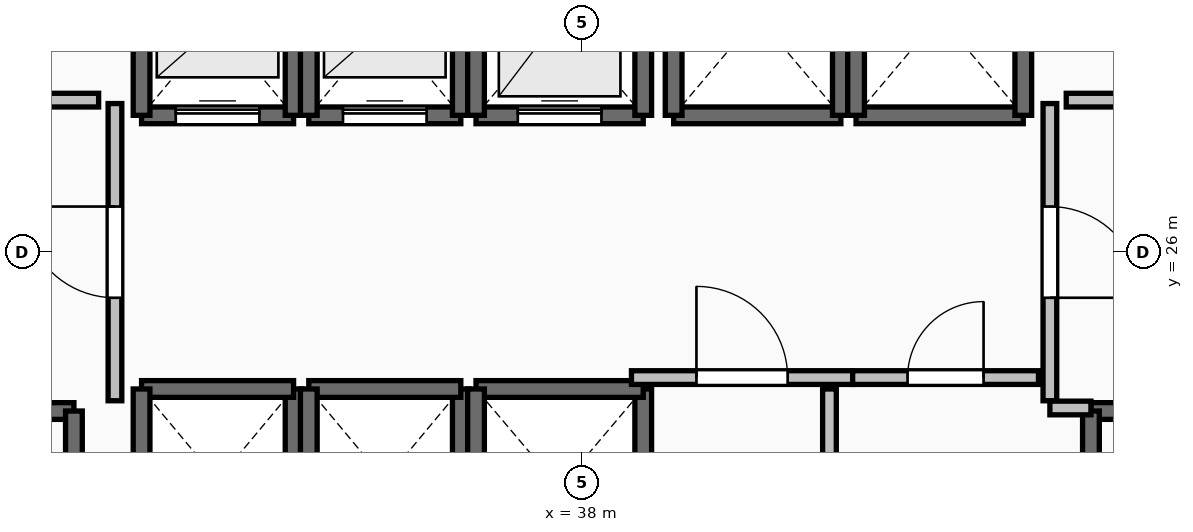
"""IFC4 building model, lengths in metres.
Left out: names, types, materials, properties, quantities, classifications, styles, units other than length and angle.
Written with IfcOpenShell. Run it as: python <this file> out.ifc"""

import sys

from ifc_helpers import new_model, si_unit, direction, frame, frame_2d, origin, place, context, subcontext, project, spatial, rectangle, extrude, element, fill, save


model = new_model("IFC4")
c1 = context("Model", 3, precision=1e-05, world=origin(), true_north=direction((0.0, 1.0)))
c2 = subcontext(c1, "Body", "Model", "MODEL_VIEW")
j1 = project(units=[si_unit("LENGTHUNIT", "METRE"), si_unit("PLANEANGLEUNIT", "RADIAN")], contexts=[c1])
p1 = place(None, origin())
s1 = spatial("IfcSite", under=j1, at=p1, CompositionType="ELEMENT")
p2 = place(p1, origin())
s2 = spatial("IfcBuilding", under=s1, at=p2, CompositionType="ELEMENT")
p3 = place(p2, frame((0.0, 0.0, 41.5)))
s3 = spatial("IfcBuildingStorey", under=s2, at=p3, CompositionType="ELEMENT", Elevation=41.5)
p4 = place(p3, frame((27.94, 23.91, 0.0), z_axis=(0.0, 0.0, 1.0), x_axis=(1.0, 0.0, 0.0)))
e1 = element("IfcWall", 1, at=p4, inside=s3, PredefinedType="SOLIDWALL", context=c2, shape_type="SweptSolid", body=[
    extrude(rectangle(XDim=3.37, YDim=0.22, at=frame_2d((1.685, 0.0))), origin(), (0.0, 0.0, 1.0), 3.24),
])
p5 = place(p4, frame((1.135, 0.0, 0.0)))
e2 = element("IfcOpeningElement", 2, at=p5, cuts=e1, PredefinedType="OPENING", context=c2, shape_type="SweptSolid", body=[
    extrude(rectangle(XDim=1.1, YDim=2.15, at=frame_2d((0.55, 1.075))), frame((0.0, 0.125, 0.0), z_axis=(0.0, -1.0, 0.0), x_axis=(1.0, 0.0, 0.0)), (0.0, 0.0, 1.0), 0.25),
])
p6 = place(p3, frame((31.31, 23.91, 0.0), z_axis=(0.0, 0.0, 1.0), x_axis=(0.0, -1.0, 0.0)))
e3 = element("IfcWall", 3, at=p6, inside=s3, PredefinedType="SOLIDWALL", context=c2, shape_type="SweptSolid", body=[
    extrude(rectangle(XDim=7.42, YDim=0.22, at=frame_2d((3.71, 0.0))), origin(), (0.0, 0.0, 1.0), 3.24),
])
p7 = place(p3, frame((44.69, 23.91, 0.0), z_axis=(0.0, 0.0, 1.0), x_axis=(1.0, 0.0, 0.0)))
e4 = element("IfcWall", 4, at=p7, inside=s3, PredefinedType="SOLIDWALL", context=c2, shape_type="SweptSolid", body=[
    extrude(rectangle(XDim=3.37, YDim=0.22, at=frame_2d((1.685, 0.0))), origin(), (0.0, 0.0, 1.0), 3.24),
])
p8 = place(p7, frame((1.135, 0.0, 0.0)))
e5 = element("IfcOpeningElement", 5, at=p8, cuts=e4, PredefinedType="OPENING", context=c2, shape_type="SweptSolid", body=[
    extrude(rectangle(XDim=1.1, YDim=2.15, at=frame_2d((0.55, 1.075))), frame((0.0, 0.125, 0.0), z_axis=(0.0, -1.0, 0.0), x_axis=(1.0, 0.0, 0.0)), (0.0, 0.0, 1.0), 0.25),
])
p9 = place(p3, frame((44.69, 16.49, 0.0), z_axis=(0.0, 0.0, 1.0), x_axis=(0.0, 1.0, 0.0)))
e6 = element("IfcWall", 6, at=p9, inside=s3, PredefinedType="SOLIDWALL", context=c2, shape_type="SweptSolid", body=[
    extrude(rectangle(XDim=7.42, YDim=0.22, at=frame_2d((3.71, 0.0))), origin(), (0.0, 0.0, 1.0), 3.24),
])
p10 = place(p3, frame((32.2, 27.8, 0.0), z_axis=(0.0, 0.0, 1.0), x_axis=(1.0, 0.0, 0.0)))
e7 = element("IfcWall", 7, at=p10, inside=s3, PredefinedType="SOLIDWALL", context=c2, shape_type="SweptSolid", body=[
    extrude(rectangle(XDim=2.0, YDim=0.22, at=frame_2d((1.0, 0.0))), origin(), (0.0, 0.0, 1.0), 3.24),
])
p11 = place(p10, frame((0.45, 0.0, 0.0)))
e8 = element("IfcOpeningElement", 8, at=p11, cuts=e7, PredefinedType="OPENING", context=c2, shape_type="SweptSolid", body=[
    extrude(rectangle(XDim=1.1, YDim=2.2, at=frame_2d((0.55, 1.1))), frame((0.0, 0.125, 0.0), z_axis=(0.0, -1.0, 0.0), x_axis=(1.0, 0.0, 0.0)), (0.0, 0.0, 1.0), 0.25),
])
for number, where, z_axis, x_axis in (
    (9, (34.2, 27.8, 0.0), (0.0, 0.0, 1.0), (0.0, 1.0, 0.0)),
    (10, (32.2, 30.2, 0.0), (0.0, 0.0, 1.0), (0.0, -1.0, 0.0)),
):
    element("IfcWall", number, at=place(p3, frame(where, z_axis=z_axis, x_axis=x_axis)), inside=s3, PredefinedType="SOLIDWALL", context=c2, shape_type="SweptSolid", body=[
        extrude(rectangle(XDim=2.4, YDim=0.22, at=frame_2d((1.2, 0.0))), origin(), (0.0, 0.0, 1.0), 3.24),
    ])
p12 = place(p3, frame((34.4, 27.8, 0.0), z_axis=(0.0, 0.0, 1.0), x_axis=(1.0, 0.0, 0.0)))
e11 = element("IfcWall", 11, at=p12, inside=s3, PredefinedType="SOLIDWALL", context=c2, shape_type="SweptSolid", body=[
    extrude(rectangle(XDim=2.0, YDim=0.22, at=frame_2d((1.0, 0.0))), origin(), (0.0, 0.0, 1.0), 3.24),
])
p13 = place(p12, frame((0.45, 0.0, 0.0)))
e12 = element("IfcOpeningElement", 12, at=p13, cuts=e11, PredefinedType="OPENING", context=c2, shape_type="SweptSolid", body=[
    extrude(rectangle(XDim=1.1, YDim=2.2, at=frame_2d((0.55, 1.1))), frame((0.0, 0.125, 0.0), z_axis=(0.0, -1.0, 0.0), x_axis=(1.0, 0.0, 0.0)), (0.0, 0.0, 1.0), 0.25),
])
for number, where, z_axis, x_axis in (
    (13, (36.4, 27.8, 0.0), (0.0, 0.0, 1.0), (0.0, 1.0, 0.0)),
    (14, (34.4, 30.2, 0.0), (0.0, 0.0, 1.0), (0.0, -1.0, 0.0)),
):
    element("IfcWall", number, at=place(p3, frame(where, z_axis=z_axis, x_axis=x_axis)), inside=s3, PredefinedType="SOLIDWALL", context=c2, shape_type="SweptSolid", body=[
        extrude(rectangle(XDim=2.4, YDim=0.22, at=frame_2d((1.2, 0.0))), origin(), (0.0, 0.0, 1.0), 3.24),
    ])
p14 = place(p3, frame((36.6, 27.8, 0.0), z_axis=(0.0, 0.0, 1.0), x_axis=(1.0, 0.0, 0.0)))
e15 = element("IfcWall", 15, at=p14, inside=s3, PredefinedType="SOLIDWALL", context=c2, shape_type="SweptSolid", body=[
    extrude(rectangle(XDim=2.2, YDim=0.22, at=frame_2d((1.1, 0.0))), origin(), (0.0, 0.0, 1.0), 3.24),
])
p15 = place(p14, frame((0.55, 0.0, 0.0)))
e16 = element("IfcOpeningElement", 16, at=p15, cuts=e15, PredefinedType="OPENING", context=c2, shape_type="SweptSolid", body=[
    extrude(rectangle(XDim=1.1, YDim=2.2, at=frame_2d((0.55, 1.1))), frame((0.0, 0.125, 0.0), z_axis=(0.0, -1.0, 0.0), x_axis=(1.0, 0.0, 0.0)), (0.0, 0.0, 1.0), 0.25),
])
for number, where, z_axis, x_axis in (
    (17, (38.8, 27.8, 0.0), (0.0, 0.0, 1.0), (0.0, 1.0, 0.0)),
    (18, (36.6, 30.4, 0.0), (0.0, 0.0, 1.0), (0.0, -1.0, 0.0)),
):
    element("IfcWall", number, at=place(p3, frame(where, z_axis=z_axis, x_axis=x_axis)), inside=s3, PredefinedType="SOLIDWALL", context=c2, shape_type="SweptSolid", body=[
        extrude(rectangle(XDim=2.6, YDim=0.22, at=frame_2d((1.3, 0.0))), origin(), (0.0, 0.0, 1.0), 3.24),
    ])
p16 = place(p3, frame((34.2, 21.8, 0.0), z_axis=(0.0, 0.0, 1.0), x_axis=(0.0, 1.0, 0.0)))
e19 = element("IfcWall", 19, at=p16, inside=s3, PredefinedType="SOLIDWALL", context=c2, shape_type="SweptSolid", body=[
    extrude(rectangle(XDim=2.4, YDim=0.22, at=frame_2d((1.2, 0.0))), origin(), (0.0, 0.0, 1.0), 3.24),
])
p17 = place(p3, frame((34.2, 24.2, 0.0), z_axis=(0.0, 0.0, 1.0), x_axis=(-1.0, 0.0, 0.0)))
e20 = element("IfcWall", 20, at=p17, inside=s3, PredefinedType="SOLIDWALL", context=c2, shape_type="SweptSolid", body=[
    extrude(rectangle(XDim=2.0, YDim=0.22, at=frame_2d((1.0, 0.0))), origin(), (0.0, 0.0, 1.0), 3.24),
])
for number, where, z_axis, x_axis in (
    (21, (32.2, 24.2, 0.0), (0.0, 0.0, 1.0), (0.0, -1.0, 0.0)),
    (22, (36.4, 21.8, 0.0), (0.0, 0.0, 1.0), (0.0, 1.0, 0.0)),
):
    element("IfcWall", number, at=place(p3, frame(where, z_axis=z_axis, x_axis=x_axis)), inside=s3, PredefinedType="SOLIDWALL", context=c2, shape_type="SweptSolid", body=[
        extrude(rectangle(XDim=2.4, YDim=0.22, at=frame_2d((1.2, 0.0))), origin(), (0.0, 0.0, 1.0), 3.24),
    ])
p18 = place(p3, frame((36.4, 24.2, 0.0), z_axis=(0.0, 0.0, 1.0), x_axis=(-1.0, 0.0, 0.0)))
e23 = element("IfcWall", 23, at=p18, inside=s3, PredefinedType="SOLIDWALL", context=c2, shape_type="SweptSolid", body=[
    extrude(rectangle(XDim=2.0, YDim=0.22, at=frame_2d((1.0, 0.0))), origin(), (0.0, 0.0, 1.0), 3.24),
])
p19 = place(p3, frame((34.4, 24.2, 0.0), z_axis=(0.0, 0.0, 1.0), x_axis=(0.0, -1.0, 0.0)))
e24 = element("IfcWall", 24, at=p19, inside=s3, PredefinedType="SOLIDWALL", context=c2, shape_type="SweptSolid", body=[
    extrude(rectangle(XDim=2.4, YDim=0.22, at=frame_2d((1.2, 0.0))), origin(), (0.0, 0.0, 1.0), 3.24),
])
p20 = place(p3, frame((38.8, 21.6, 0.0), z_axis=(0.0, 0.0, 1.0), x_axis=(0.0, 1.0, 0.0)))
e25 = element("IfcWall", 25, at=p20, inside=s3, PredefinedType="SOLIDWALL", context=c2, shape_type="SweptSolid", body=[
    extrude(rectangle(XDim=2.6, YDim=0.22, at=frame_2d((1.3, 0.0))), origin(), (0.0, 0.0, 1.0), 3.24),
])
p21 = place(p3, frame((38.8, 24.2, 0.0), z_axis=(0.0, 0.0, 1.0), x_axis=(-1.0, 0.0, 0.0)))
e26 = element("IfcWall", 26, at=p21, inside=s3, PredefinedType="SOLIDWALL", context=c2, shape_type="SweptSolid", body=[
    extrude(rectangle(XDim=2.2, YDim=0.22, at=frame_2d((1.1, 0.0))), origin(), (0.0, 0.0, 1.0), 3.24),
])
p22 = place(p3, frame((36.6, 24.2, 0.0), z_axis=(0.0, 0.0, 1.0), x_axis=(0.0, -1.0, 0.0)))
e27 = element("IfcWall", 27, at=p22, inside=s3, PredefinedType="SOLIDWALL", context=c2, shape_type="SweptSolid", body=[
    extrude(rectangle(XDim=2.6, YDim=0.22, at=frame_2d((1.3, 0.0))), origin(), (0.0, 0.0, 1.0), 3.24),
])
p23 = place(p3, frame((39.2, 27.8, 0.0), z_axis=(0.0, 0.0, 1.0), x_axis=(1.0, 0.0, 0.0)))
e28 = element("IfcWall", 28, at=p23, inside=s3, PredefinedType="SOLIDWALL", context=c2, shape_type="SweptSolid", body=[
    extrude(rectangle(XDim=2.2, YDim=0.22, at=frame_2d((1.1, 0.0))), origin(), (0.0, 0.0, 1.0), 3.24),
])
for number, where, z_axis, x_axis in (
    (29, (41.4, 27.8, 0.0), (0.0, 0.0, 1.0), (0.0, 1.0, 0.0)),
    (30, (39.2, 30.4, 0.0), (0.0, 0.0, 1.0), (0.0, -1.0, 0.0)),
):
    element("IfcWall", number, at=place(p3, frame(where, z_axis=z_axis, x_axis=x_axis)), inside=s3, PredefinedType="SOLIDWALL", context=c2, shape_type="SweptSolid", body=[
        extrude(rectangle(XDim=2.6, YDim=0.22, at=frame_2d((1.3, 0.0))), origin(), (0.0, 0.0, 1.0), 3.24),
    ])
p24 = place(p3, frame((41.6, 27.8, 0.0), z_axis=(0.0, 0.0, 1.0), x_axis=(1.0, 0.0, 0.0)))
e31 = element("IfcWall", 31, at=p24, inside=s3, PredefinedType="SOLIDWALL", context=c2, shape_type="SweptSolid", body=[
    extrude(rectangle(XDim=2.2, YDim=0.22, at=frame_2d((1.1, 0.0))), origin(), (0.0, 0.0, 1.0), 3.24),
])
for number, where, z_axis, x_axis in (
    (32, (43.8, 27.8, 0.0), (0.0, 0.0, 1.0), (0.0, 1.0, 0.0)),
    (33, (41.6, 30.4, 0.0), (0.0, 0.0, 1.0), (0.0, -1.0, 0.0)),
):
    element("IfcWall", number, at=place(p3, frame(where, z_axis=z_axis, x_axis=x_axis)), inside=s3, PredefinedType="SOLIDWALL", context=c2, shape_type="SweptSolid", body=[
        extrude(rectangle(XDim=2.6, YDim=0.22, at=frame_2d((1.3, 0.0))), origin(), (0.0, 0.0, 1.0), 3.24),
    ])
p25 = place(p3, frame((31.85, 24.045, 0.0), z_axis=(0.0, 0.0, 1.0), x_axis=(0.0, 1.0, 0.0)))
e34 = element("IfcWall", 34, at=p25, inside=s3, PredefinedType="PARTITIONING", context=c2, shape_type="SweptSolid", body=[
    extrude(rectangle(XDim=3.91, YDim=0.18, at=frame_2d((1.955, 0.0))), origin(), (0.0, 0.0, 1.0), 3.24),
])
p26 = place(p25, frame((1.355, 0.0, 0.0)))
e35 = element("IfcOpeningElement", 35, at=p26, cuts=e34, PredefinedType="OPENING", context=c2, shape_type="SweptSolid", body=[
    extrude(rectangle(XDim=1.2, YDim=2.15, at=frame_2d((0.6, 1.075))), frame((0.0, 0.105, 0.0), z_axis=(0.0, -1.0, 0.0), x_axis=(1.0, 0.0, 0.0)), (0.0, 0.0, 1.0), 0.21),
])
p27 = place(p3, frame((44.15, 27.955, 0.0), z_axis=(0.0, 0.0, 1.0), x_axis=(0.0, -1.0, 0.0)))
e36 = element("IfcWall", 36, at=p27, inside=s3, PredefinedType="PARTITIONING", context=c2, shape_type="SweptSolid", body=[
    extrude(rectangle(XDim=3.91, YDim=0.18, at=frame_2d((1.955, 0.0))), origin(), (0.0, 0.0, 1.0), 3.24),
])
p28 = place(p27, frame((1.355, 0.0, 0.0)))
e37 = element("IfcOpeningElement", 37, at=p28, cuts=e36, PredefinedType="OPENING", context=c2, shape_type="SweptSolid", body=[
    extrude(rectangle(XDim=1.2, YDim=2.15, at=frame_2d((0.6, 1.075))), frame((0.0, 0.105, 0.0), z_axis=(0.0, -1.0, 0.0), x_axis=(1.0, 0.0, 0.0)), (0.0, 0.0, 1.0), 0.21),
])
p29 = place(p3, frame((44.15, 23.95, 0.0), z_axis=(0.0, 0.0, 1.0), x_axis=(1.0, 0.0, 0.0)))
e38 = element("IfcWall", 38, at=p29, inside=s3, PredefinedType="PARTITIONING", context=c2, shape_type="SweptSolid", body=[
    extrude(rectangle(XDim=0.54, YDim=0.18, at=frame_2d((0.27, 0.0))), origin(), (0.0, 0.0, 1.0), 3.24),
])
p30 = place(p3, frame((38.645, 24.35, 0.0), z_axis=(0.0, 0.0, 1.0), x_axis=(1.0, 0.0, 0.0)))
e39 = element("IfcWall", 39, at=p30, inside=s3, PredefinedType="PARTITIONING", context=c2, shape_type="SweptSolid", body=[
    extrude(rectangle(XDim=2.91, YDim=0.18, at=frame_2d((1.455, 0.0))), origin(), (0.0, 0.0, 1.0), 3.24),
])
p31 = place(p30, frame((0.855, 0.0, 0.0)))
e40 = element("IfcOpeningElement", 40, at=p31, cuts=e39, PredefinedType="OPENING", context=c2, shape_type="SweptSolid", body=[
    extrude(rectangle(XDim=1.2, YDim=2.15, at=frame_2d((0.6, 1.075))), frame((0.0, 0.105, 0.0), z_axis=(0.0, -1.0, 0.0), x_axis=(1.0, 0.0, 0.0)), (0.0, 0.0, 1.0), 0.21),
])
p32 = place(p3, frame((41.555, 24.35, 0.0), z_axis=(0.0, 0.0, 1.0), x_axis=(1.0, 0.0, 0.0)))
e41 = element("IfcWall", 41, at=p32, inside=s3, PredefinedType="PARTITIONING", context=c2, shape_type="SweptSolid", body=[
    extrude(rectangle(XDim=2.445, YDim=0.18, at=frame_2d((1.223, 0.0))), origin(), (0.0, 0.0, 1.0), 3.24),
])
p33 = place(p32, frame((0.722, 0.0, 0.0)))
e42 = element("IfcOpeningElement", 42, at=p33, cuts=e41, PredefinedType="OPENING", context=c2, shape_type="SweptSolid", body=[
    extrude(rectangle(XDim=1.0, YDim=2.15, at=frame_2d((0.5, 1.075))), frame((0.0, 0.105, 0.0), z_axis=(0.0, -1.0, 0.0), x_axis=(1.0, 0.0, 0.0)), (0.0, 0.0, 1.0), 0.21),
])
p34 = place(p3, frame((41.25, 20.305, 0.0), z_axis=(0.0, 0.0, 1.0), x_axis=(0.0, 1.0, 0.0)))
e43 = element("IfcWall", 43, at=p34, inside=s3, PredefinedType="PARTITIONING", context=c2, shape_type="SweptSolid", body=[
    extrude(rectangle(XDim=3.895, YDim=0.18, at=frame_2d((1.948, 0.0))), origin(), (0.0, 0.0, 1.0), 3.24),
])
p35 = place(p34, frame((1.448, 0.0, 0.0)))
e44 = element("IfcOpeningElement", 44, at=p35, cuts=e43, PredefinedType="OPENING", context=c2, shape_type="SweptSolid", body=[
    extrude(rectangle(XDim=1.0, YDim=2.15, at=frame_2d((0.5, 1.075))), frame((0.0, 0.105, 0.0), z_axis=(0.0, -1.0, 0.0), x_axis=(1.0, 0.0, 0.0)), (0.0, 0.0, 1.0), 0.21),
])
for number, where, z_axis, x_axis in (
    (45, (31.635, 28.0, 0.0), (0.0, 0.0, 1.0), (-1.0, 0.0, 0.0)),
    (46, (45.28, 28.0, 0.0), (0.0, 0.0, 1.0), (-1.0, 0.0, 0.0)),
):
    element("IfcWall", number, at=place(p3, frame(where, z_axis=z_axis, x_axis=x_axis)), inside=s3, PredefinedType="PARTITIONING", context=c2, shape_type="SweptSolid", body=[
        extrude(rectangle(XDim=0.915, YDim=0.18, at=frame_2d((0.458, 0.0))), origin(), (0.0, 0.0, 1.0), 3.24),
    ])
p36 = place(p11, origin())
e47 = element("IfcDoor", 47, at=p36, inside=s3, OperationType="SLIDING_TO_LEFT", PredefinedType="DOOR", context=c2, shape_type="SweptSolid", body=[
    extrude(rectangle(XDim=1.1, YDim=2.2, at=frame_2d((0.55, 1.1))), frame((0.0, 0.025, 0.0), z_axis=(0.0, -1.0, 0.0), x_axis=(1.0, 0.0, 0.0)), (0.0, 0.0, 1.0), 0.05),
])
fill(e8, e47)
p37 = place(p13, origin())
e48 = element("IfcDoor", 48, at=p37, inside=s3, OperationType="SLIDING_TO_LEFT", PredefinedType="DOOR", context=c2, shape_type="SweptSolid", body=[
    extrude(rectangle(XDim=1.1, YDim=2.2, at=frame_2d((0.55, 1.1))), frame((0.0, 0.025, 0.0), z_axis=(0.0, -1.0, 0.0), x_axis=(1.0, 0.0, 0.0)), (0.0, 0.0, 1.0), 0.05),
])
fill(e12, e48)
p38 = place(p15, origin())
e49 = element("IfcDoor", 49, at=p38, inside=s3, OperationType="SLIDING_TO_LEFT", PredefinedType="DOOR", context=c2, shape_type="SweptSolid", body=[
    extrude(rectangle(XDim=1.1, YDim=2.2, at=frame_2d((0.55, 1.1))), frame((0.0, 0.025, 0.0), z_axis=(0.0, -1.0, 0.0), x_axis=(1.0, 0.0, 0.0)), (0.0, 0.0, 1.0), 0.05),
])
fill(e16, e49)
p39 = place(p26, origin())
e50 = element("IfcDoor", 50, at=p39, inside=s3, OperationType="SINGLE_SWING_RIGHT", PredefinedType="DOOR", context=c2, shape_type="SweptSolid", body=[
    extrude(rectangle(XDim=1.2, YDim=2.15, at=frame_2d((0.6, 1.075))), frame((0.0, 0.025, 0.0), z_axis=(0.0, -1.0, 0.0), x_axis=(1.0, 0.0, 0.0)), (0.0, 0.0, 1.0), 0.05),
])
fill(e35, e50)
p40 = place(p28, origin())
e51 = element("IfcDoor", 51, at=p40, inside=s3, OperationType="SINGLE_SWING_RIGHT", PredefinedType="DOOR", context=c2, shape_type="SweptSolid", body=[
    extrude(rectangle(XDim=1.2, YDim=2.15, at=frame_2d((0.6, 1.075))), frame((0.0, 0.025, 0.0), z_axis=(0.0, -1.0, 0.0), x_axis=(1.0, 0.0, 0.0)), (0.0, 0.0, 1.0), 0.05),
])
fill(e37, e51)
p41 = place(p31, origin())
e52 = element("IfcDoor", 52, at=p41, inside=s3, OperationType="SINGLE_SWING_LEFT", PredefinedType="DOOR", context=c2, shape_type="SweptSolid", body=[
    extrude(rectangle(XDim=1.2, YDim=2.15, at=frame_2d((0.6, 1.075))), frame((0.0, 0.025, 0.0), z_axis=(0.0, -1.0, 0.0), x_axis=(1.0, 0.0, 0.0)), (0.0, 0.0, 1.0), 0.05),
])
fill(e40, e52)
p42 = place(p33, origin())
e53 = element("IfcDoor", 53, at=p42, inside=s3, OperationType="SINGLE_SWING_RIGHT", PredefinedType="DOOR", context=c2, shape_type="SweptSolid", body=[
    extrude(rectangle(XDim=1.0, YDim=2.15, at=frame_2d((0.5, 1.075))), frame((0.0, 0.025, 0.0), z_axis=(0.0, -1.0, 0.0), x_axis=(1.0, 0.0, 0.0)), (0.0, 0.0, 1.0), 0.05),
])
fill(e42, e53)
save(model, sys.argv[1])
